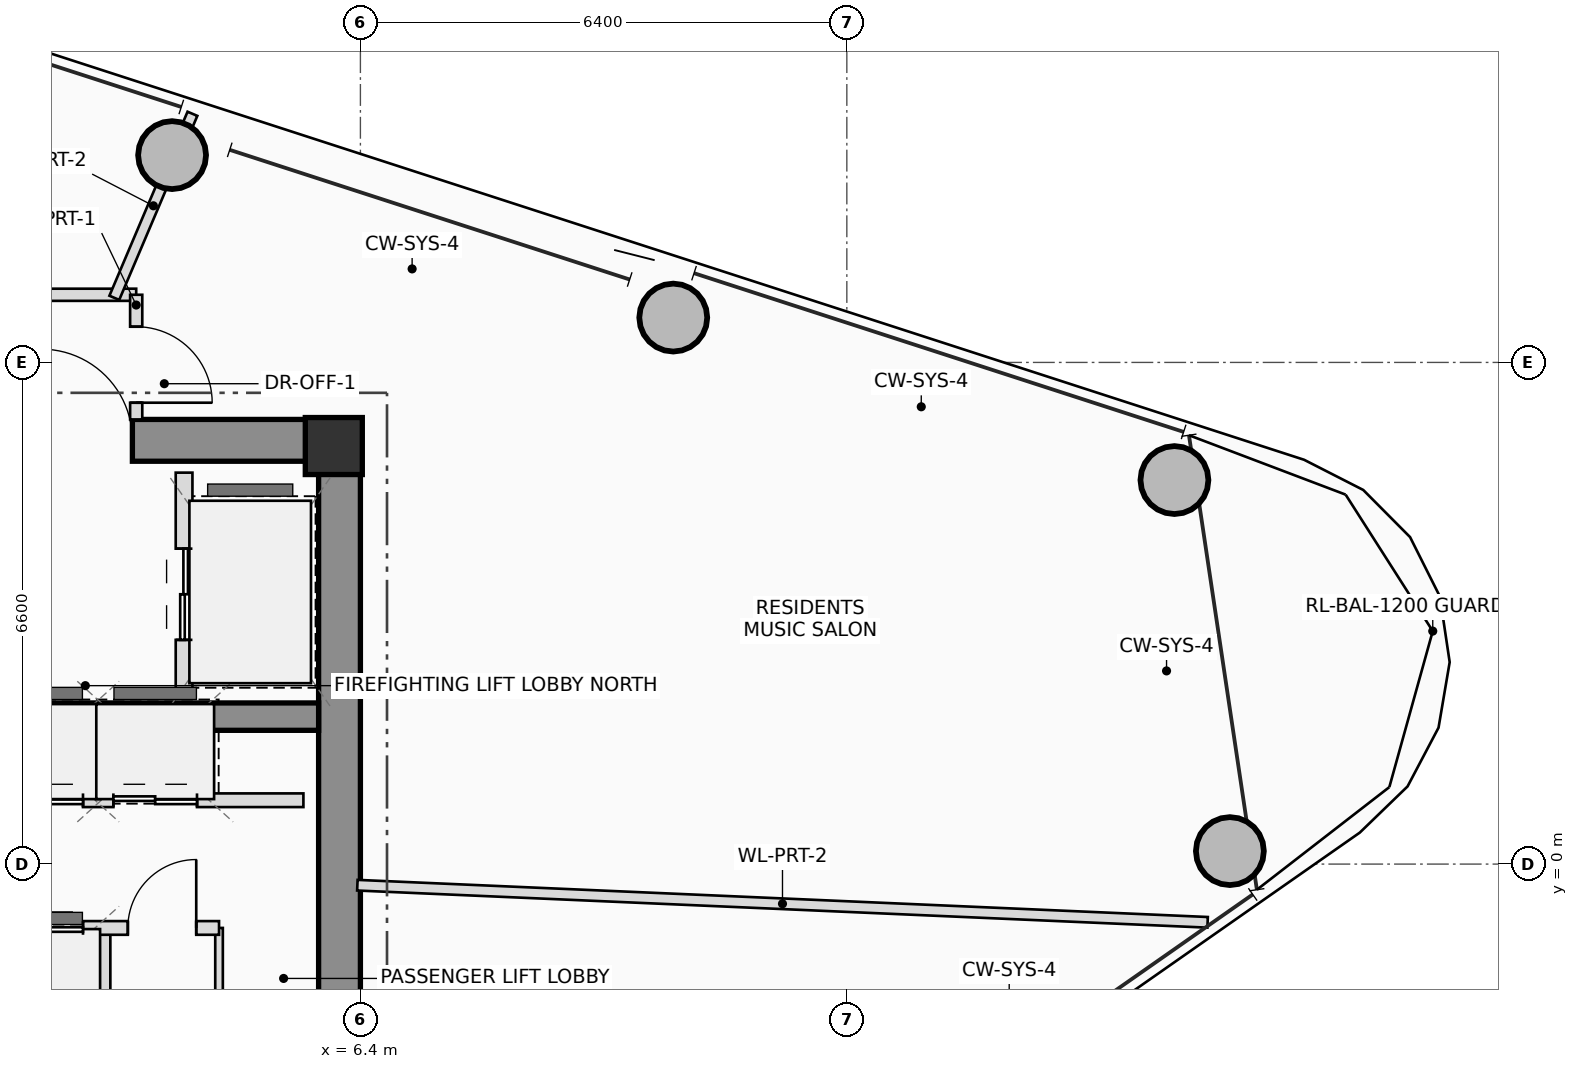
"""IFC4 building model, lengths in metres.
Left out: names, types, materials, properties, quantities, classifications, styles, units other than length and angle.
Written with IfcOpenShell. Run it as: python <this file> out.ifc"""

import sys

from ifc_helpers import new_model, si_unit, direction, frame, frame_2d, origin, origin_2d, place, context, subcontext, project, spatial, rectangle, hollow_circle, extrude, source, transform, mapped, element, fill, save


model = new_model("IFC4")
c1 = context("Model", 3, precision=1e-05, world=origin(), true_north=direction((0.0, 1.0)))
c2 = subcontext(c1, "Body", "Model", "MODEL_VIEW")
j1 = project(units=[si_unit("LENGTHUNIT", "METRE"), si_unit("PLANEANGLEUNIT", "RADIAN")], contexts=[c1])
p1 = place(None, origin())
s1 = spatial("IfcSite", under=j1, at=p1, CompositionType="ELEMENT")
p2 = place(p1, origin())
s2 = spatial("IfcBuilding", under=s1, at=p2, CompositionType="ELEMENT")
p3 = place(p2, frame((0.0, 0.0, 267.75)))
s3 = spatial("IfcBuildingStorey", under=s2, at=p3, CompositionType="ELEMENT", Elevation=267.75)
m1 = source(origin(), c2, "Body", "SweptSolid", [
    extrude(rectangle(XDim=0.75, YDim=0.75, at=origin_2d()), origin(), (0.0, 0.0, 1.0), 3.4),
])
p4 = place(p3, frame((6.05, 5.5, 0.0), z_axis=(0.0, 0.0, 1.0), x_axis=(1.0, 0.0, 0.0)))
e1 = element("IfcColumn", 1, at=p4, inside=s3, PredefinedType="COLUMN", context=c2, shape_type="MappedRepresentation", body=[
    mapped(m1, transform((0.0, 0.0, 0.0), scale=1.0)),
])
p5 = place(p3, frame((-6.4, 5.575, 0.0), z_axis=(0.0, 0.0, 1.0), x_axis=(1.0, 0.0, 0.0)))
e2 = element("IfcWall", 2, at=p5, inside=s3, PredefinedType="SHEAR", context=c2, shape_type="SweptSolid", body=[
    extrude(rectangle(XDim=12.8, YDim=0.55, at=frame_2d((6.4, 0.0))), origin(), (0.0, 0.0, 1.0), 3.4),
])
p6 = place(p5, frame((8.6, 0.0, 0.0)))
e3 = element("IfcOpeningElement", 3, at=p6, cuts=e2, PredefinedType="OPENING", context=c2, shape_type="SweptSolid", body=[
    extrude(rectangle(XDim=1.2, YDim=2.2, at=frame_2d((0.6, 1.1))), frame((0.0, 0.285, 0.0), z_axis=(0.0, -1.0, 0.0), x_axis=(1.0, 0.0, 0.0)), (0.0, 0.0, 1.0), 0.57),
])
p7 = place(p3, frame((6.125, -5.3, 0.0), z_axis=(0.0, 0.0, 1.0), x_axis=(0.0, 1.0, 0.0)))
e4 = element("IfcWall", 4, at=p7, inside=s3, PredefinedType="SHEAR", context=c2, shape_type="SweptSolid", body=[
    extrude(rectangle(XDim=10.6, YDim=0.55, at=frame_2d((5.3, 0.0))), origin(), (0.0, 0.0, 1.0), 3.4),
])
p8 = place(p3, frame((-5.85, 1.94, 0.0), z_axis=(0.0, 0.0, 1.0), x_axis=(1.0, 0.0, 0.0)))
e5 = element("IfcWall", 5, at=p8, inside=s3, PredefinedType="SHEAR", context=c2, shape_type="SweptSolid", body=[
    extrude(rectangle(XDim=11.7, YDim=0.36, at=frame_2d((5.85, 0.0))), origin(), (0.0, 0.0, 1.0), 3.4),
])
m2 = source(origin(), c2, "Body", "SweptSolid", [
    extrude(hollow_circle(Radius=0.45, WallThickness=0.032, at=origin_2d()), origin(), (0.0, 0.0, 1.0), 3.4),
])
for number, where, z_axis, x_axis in (
    (6, (17.84, 0.171, 0.0), (0.0, 0.0, 1.0), (1.0, 0.0, 0.0)),
    (7, (17.11, 5.052, 0.0), (0.0, 0.0, 1.0), (1.0, 0.0, 0.0)),
    (8, (10.516, 7.19, 0.0), (0.0, 0.0, 1.0), (1.0, 0.0, 0.0)),
    (9, (3.922, 9.327, 0.0), (0.0, 0.0, 1.0), (1.0, 0.0, 0.0)),
):
    element("IfcColumn", number, at=place(p3, frame(where, z_axis=z_axis, x_axis=x_axis)), inside=s3, PredefinedType="COLUMN", context=c2, shape_type="MappedRepresentation", body=[
        mapped(m2, transform((0.0, 0.0, 0.0), scale=1.0)),
    ])
p9 = place(p3, frame((4.08, 2.2, 0.0), z_axis=(0.0, 0.0, 1.0), x_axis=(0.0, 1.0, 0.0)))
e10 = element("IfcWall", 10, at=p9, inside=s3, PredefinedType="PLUMBINGWALL", context=c2, shape_type="SweptSolid", body=[
    extrude(rectangle(XDim=2.95, YDim=0.22, at=frame_2d((1.475, 0.0))), origin(), (0.0, 0.0, 1.0), 3.2),
])
p10 = place(p9, frame((0.75, 0.0, 0.0)))
e11 = element("IfcOpeningElement", 11, at=p10, cuts=e10, PredefinedType="OPENING", context=c2, shape_type="SweptSolid", body=[
    extrude(rectangle(XDim=1.2, YDim=2.25, at=frame_2d((0.6, 1.125))), frame((0.0, 0.12, 0.0), z_axis=(0.0, -1.0, 0.0), x_axis=(1.0, 0.0, 0.0)), (0.0, 0.0, 1.0), 0.24),
])
for number, where, z_axis, x_axis in (
    (12, (3.02, 0.84, 0.0), (0.0, 0.0, 1.0), (0.0, 1.0, 0.0)),
    (13, (4.38, 0.84, 0.0), (0.0, 0.0, 1.0), (0.0, 1.0, 0.0)),
    (14, (3.02, -1.82, 0.0), (0.0, 0.0, 1.0), (0.0, 1.0, 0.0)),
):
    element("IfcWall", number, at=place(p3, frame(where, z_axis=z_axis, x_axis=x_axis)), inside=s3, PredefinedType="PLUMBINGWALL", context=c2, shape_type="SweptSolid", body=[
        extrude(rectangle(XDim=0.98, YDim=0.18, at=frame_2d((0.49, 0.0))), origin(), (0.0, 0.0, 1.0), 3.2),
    ])
p11 = place(p3, frame((4.54, -1.82, 0.0), z_axis=(0.0, 0.0, 1.0), x_axis=(0.0, 1.0, 0.0)))
e15 = element("IfcWall", 15, at=p11, inside=s3, PredefinedType="PARTITIONING", context=c2, shape_type="SweptSolid", body=[
    extrude(rectangle(XDim=0.98, YDim=0.1, at=frame_2d((0.49, 0.0))), origin(), (0.0, 0.0, 1.0), 3.2),
])
p12 = place(p3, frame((-5.68, 0.84, 0.0), z_axis=(0.0, 0.0, 1.0), x_axis=(1.0, 0.0, 0.0)))
e16 = element("IfcWall", 16, at=p12, inside=s3, PredefinedType="PLUMBINGWALL", context=c2, shape_type="SweptSolid", body=[
    extrude(rectangle(XDim=11.33, YDim=0.18, at=frame_2d((5.665, 0.0))), origin(), (0.0, 0.0, 1.0), 3.2),
])
p13 = place(p12, frame((3.13, 0.0, 0.0)))
e17 = element("IfcOpeningElement", 17, at=p13, cuts=e16, PredefinedType="OPENING", context=c2, shape_type="SweptSolid", body=[
    extrude(rectangle(XDim=0.9, YDim=2.05, at=frame_2d((0.45, 1.025))), frame((0.0, 0.1, 0.0), z_axis=(0.0, -1.0, 0.0), x_axis=(1.0, 0.0, 0.0)), (0.0, 0.0, 1.0), 0.2),
])
p14 = place(p12, frame((7.33, 0.0, 0.0)))
e18 = element("IfcOpeningElement", 18, at=p14, cuts=e16, PredefinedType="OPENING", context=c2, shape_type="SweptSolid", body=[
    extrude(rectangle(XDim=1.1, YDim=2.2, at=frame_2d((0.55, 1.1))), frame((0.0, 0.1, 0.0), z_axis=(0.0, -1.0, 0.0), x_axis=(1.0, 0.0, 0.0)), (0.0, 0.0, 1.0), 0.2),
])
p15 = place(p12, frame((8.83, 0.0, 0.0)))
e19 = element("IfcOpeningElement", 19, at=p15, cuts=e16, PredefinedType="OPENING", context=c2, shape_type="SweptSolid", body=[
    extrude(rectangle(XDim=1.1, YDim=2.2, at=frame_2d((0.55, 1.1))), frame((0.0, 0.1, 0.0), z_axis=(0.0, -1.0, 0.0), x_axis=(1.0, 0.0, 0.0)), (0.0, 0.0, 1.0), 0.2),
])
p16 = place(p3, frame((-5.68, -0.84, 0.0), z_axis=(0.0, 0.0, 1.0), x_axis=(1.0, 0.0, 0.0)))
e20 = element("IfcWall", 20, at=p16, inside=s3, PredefinedType="PLUMBINGWALL", context=c2, shape_type="SweptSolid", body=[
    extrude(rectangle(XDim=10.22, YDim=0.18, at=frame_2d((5.11, 0.0))), origin(), (0.0, 0.0, 1.0), 3.2),
])
p17 = place(p16, frame((1.88, 0.0, 0.0)))
e21 = element("IfcOpeningElement", 21, at=p17, cuts=e20, PredefinedType="OPENING", context=c2, shape_type="SweptSolid", body=[
    extrude(rectangle(XDim=0.9, YDim=2.05, at=frame_2d((0.45, 1.025))), frame((0.0, 0.1, 0.0), z_axis=(0.0, -1.0, 0.0), x_axis=(1.0, 0.0, 0.0)), (0.0, 0.0, 1.0), 0.2),
])
p18 = place(p16, frame((5.35, 0.0, 0.0)))
e22 = element("IfcOpeningElement", 22, at=p18, cuts=e20, PredefinedType="OPENING", context=c2, shape_type="SweptSolid", body=[
    extrude(rectangle(XDim=0.9, YDim=2.05, at=frame_2d((0.45, 1.025))), frame((0.0, 0.1, 0.0), z_axis=(0.0, -1.0, 0.0), x_axis=(1.0, 0.0, 0.0)), (0.0, 0.0, 1.0), 0.2),
])
p19 = place(p16, frame((7.33, 0.0, 0.0)))
e23 = element("IfcOpeningElement", 23, at=p19, cuts=e20, PredefinedType="OPENING", context=c2, shape_type="SweptSolid", body=[
    extrude(rectangle(XDim=1.1, YDim=2.2, at=frame_2d((0.55, 1.1))), frame((0.0, 0.1, 0.0), z_axis=(0.0, -1.0, 0.0), x_axis=(1.0, 0.0, 0.0)), (0.0, 0.0, 1.0), 0.2),
])
p20 = place(p16, frame((9.02, 0.0, 0.0)))
e24 = element("IfcOpeningElement", 24, at=p20, cuts=e20, PredefinedType="OPENING", context=c2, shape_type="SweptSolid", body=[
    extrude(rectangle(XDim=0.9, YDim=2.05, at=frame_2d((0.45, 1.025))), frame((0.0, 0.1, 0.0), z_axis=(0.0, -1.0, 0.0), x_axis=(1.0, 0.0, 0.0)), (0.0, 0.0, 1.0), 0.2),
])
p21 = place(p3, frame((-6.36, 7.49, 0.0), z_axis=(0.0, 0.0, 1.0), x_axis=(1.0, 0.0, 0.0)))
e25 = element("IfcWall", 25, at=p21, inside=s3, PredefinedType="PARTITIONING", context=c2, shape_type="SweptSolid", body=[
    extrude(rectangle(XDim=9.81, YDim=0.16, at=frame_2d((4.905, 0.0))), origin(), (0.0, 0.0, 1.0), 2.605),
])
p22 = place(p21, frame((5.385, 0.0, 0.0)))
e26 = element("IfcOpeningElement", 26, at=p22, cuts=e25, PredefinedType="OPENING", context=c2, shape_type="SweptSolid", body=[
    extrude(rectangle(XDim=1.0, YDim=2.25, at=frame_2d((0.5, 1.125))), frame((0.0, 0.09, 0.0), z_axis=(0.0, -1.0, 0.0), x_axis=(1.0, 0.0, 0.0)), (0.0, 0.0, 1.0), 0.18),
])
p23 = place(p3, frame((3.45, 7.49, 0.0), z_axis=(0.0, 0.0, 1.0), x_axis=(0.0, -1.0, 0.0)))
e27 = element("IfcWall", 27, at=p23, inside=s3, PredefinedType="PARTITIONING", context=c2, shape_type="SweptSolid", body=[
    extrude(rectangle(XDim=1.64, YDim=0.16, at=frame_2d((0.82, 0.0))), origin(), (0.0, 0.0, 1.0), 2.805),
])
p24 = place(p23, frame((0.42, 0.0, 0.0)))
e28 = element("IfcOpeningElement", 28, at=p24, cuts=e27, PredefinedType="OPENING", context=c2, shape_type="SweptSolid", body=[
    extrude(rectangle(XDim=1.0, YDim=2.25, at=frame_2d((0.5, 1.125))), frame((0.0, 0.09, 0.0), z_axis=(0.0, -1.0, 0.0), x_axis=(1.0, 0.0, 0.0)), (0.0, 0.0, 1.0), 0.18),
])
p25 = place(p3, frame((6.36, -0.278, 0.0), z_axis=(0.0, 0.0, 1.0), x_axis=(0.999047788643, -0.043629302162, 0.0)))
e29 = element("IfcWall", 29, at=p25, inside=s3, PredefinedType="PARTITIONING", context=c2, shape_type="SweptSolid", body=[
    extrude(rectangle(XDim=11.197, YDim=0.14, at=frame_2d((5.599, 0.0))), origin(), (0.0, 0.0, 1.0), 2.765),
])
p26 = place(p3, frame((3.162, 7.45, 0.0), z_axis=(0.0, 0.0, 1.0), x_axis=(0.390769134848, 0.920488719784, 0.0)))
e30 = element("IfcWall", 30, at=p26, inside=s3, PredefinedType="PARTITIONING", context=c2, shape_type="SweptSolid", body=[
    extrude(rectangle(XDim=2.63, YDim=0.14, at=frame_2d((1.315, 0.0))), origin(), (0.0, 0.0, 1.0), 2.805),
])
p27 = place(p6, origin())
e31 = element("IfcDoor", 31, at=p27, inside=s3, OperationType="SINGLE_SWING_LEFT", PredefinedType="DOOR", context=c2, shape_type="SweptSolid", body=[
    extrude(rectangle(XDim=1.2, YDim=2.2, at=frame_2d((0.6, 1.1))), frame((0.0, 0.025, 0.0), z_axis=(0.0, -1.0, 0.0), x_axis=(1.0, 0.0, 0.0)), (0.0, 0.0, 1.0), 0.05),
])
fill(e3, e31)
p28 = place(p10, origin())
e32 = element("IfcDoor", 32, at=p28, inside=s3, OperationType="DOUBLE_DOOR_SLIDING", PredefinedType="DOOR", context=c2, shape_type="SweptSolid", body=[
    extrude(rectangle(XDim=1.2, YDim=2.25, at=frame_2d((0.6, 1.125))), frame((0.0, 0.025, 0.0), z_axis=(0.0, -1.0, 0.0), x_axis=(1.0, 0.0, 0.0)), (0.0, 0.0, 1.0), 0.05),
])
fill(e11, e32)
p29 = place(p14, origin())
e33 = element("IfcDoor", 33, at=p29, inside=s3, OperationType="DOUBLE_DOOR_SLIDING", PredefinedType="DOOR", context=c2, shape_type="SweptSolid", body=[
    extrude(rectangle(XDim=1.1, YDim=2.2, at=frame_2d((0.55, 1.1))), frame((0.0, 0.025, 0.0), z_axis=(0.0, -1.0, 0.0), x_axis=(1.0, 0.0, 0.0)), (0.0, 0.0, 1.0), 0.05),
])
fill(e18, e33)
p30 = place(p15, origin())
e34 = element("IfcDoor", 34, at=p30, inside=s3, OperationType="DOUBLE_DOOR_SLIDING", PredefinedType="DOOR", context=c2, shape_type="SweptSolid", body=[
    extrude(rectangle(XDim=1.1, YDim=2.2, at=frame_2d((0.55, 1.1))), frame((0.0, 0.025, 0.0), z_axis=(0.0, -1.0, 0.0), x_axis=(1.0, 0.0, 0.0)), (0.0, 0.0, 1.0), 0.05),
])
fill(e19, e34)
p31 = place(p19, origin())
e35 = element("IfcDoor", 35, at=p31, inside=s3, OperationType="DOUBLE_DOOR_SLIDING", PredefinedType="DOOR", context=c2, shape_type="SweptSolid", body=[
    extrude(rectangle(XDim=1.1, YDim=2.2, at=frame_2d((0.55, 1.1))), frame((0.0, 0.025, 0.0), z_axis=(0.0, -1.0, 0.0), x_axis=(1.0, 0.0, 0.0)), (0.0, 0.0, 1.0), 0.05),
])
fill(e23, e35)
p32 = place(p20, origin())
e36 = element("IfcDoor", 36, at=p32, inside=s3, OperationType="SINGLE_SWING_RIGHT", PredefinedType="DOOR", context=c2, shape_type="SweptSolid", body=[
    extrude(rectangle(XDim=0.9, YDim=2.05, at=frame_2d((0.45, 1.025))), frame((0.0, 0.025, 0.0), z_axis=(0.0, -1.0, 0.0), x_axis=(1.0, 0.0, 0.0)), (0.0, 0.0, 1.0), 0.05),
])
fill(e24, e36)
p33 = place(p24, origin())
e37 = element("IfcDoor", 37, at=p33, inside=s3, OperationType="SINGLE_SWING_RIGHT", PredefinedType="DOOR", context=c2, shape_type="SweptSolid", body=[
    extrude(rectangle(XDim=1.0, YDim=2.25, at=frame_2d((0.5, 1.125))), frame((0.0, 0.025, 0.0), z_axis=(0.0, -1.0, 0.0), x_axis=(1.0, 0.0, 0.0)), (0.0, 0.0, 1.0), 0.05),
])
fill(e28, e37)
save(model, sys.argv[1])
